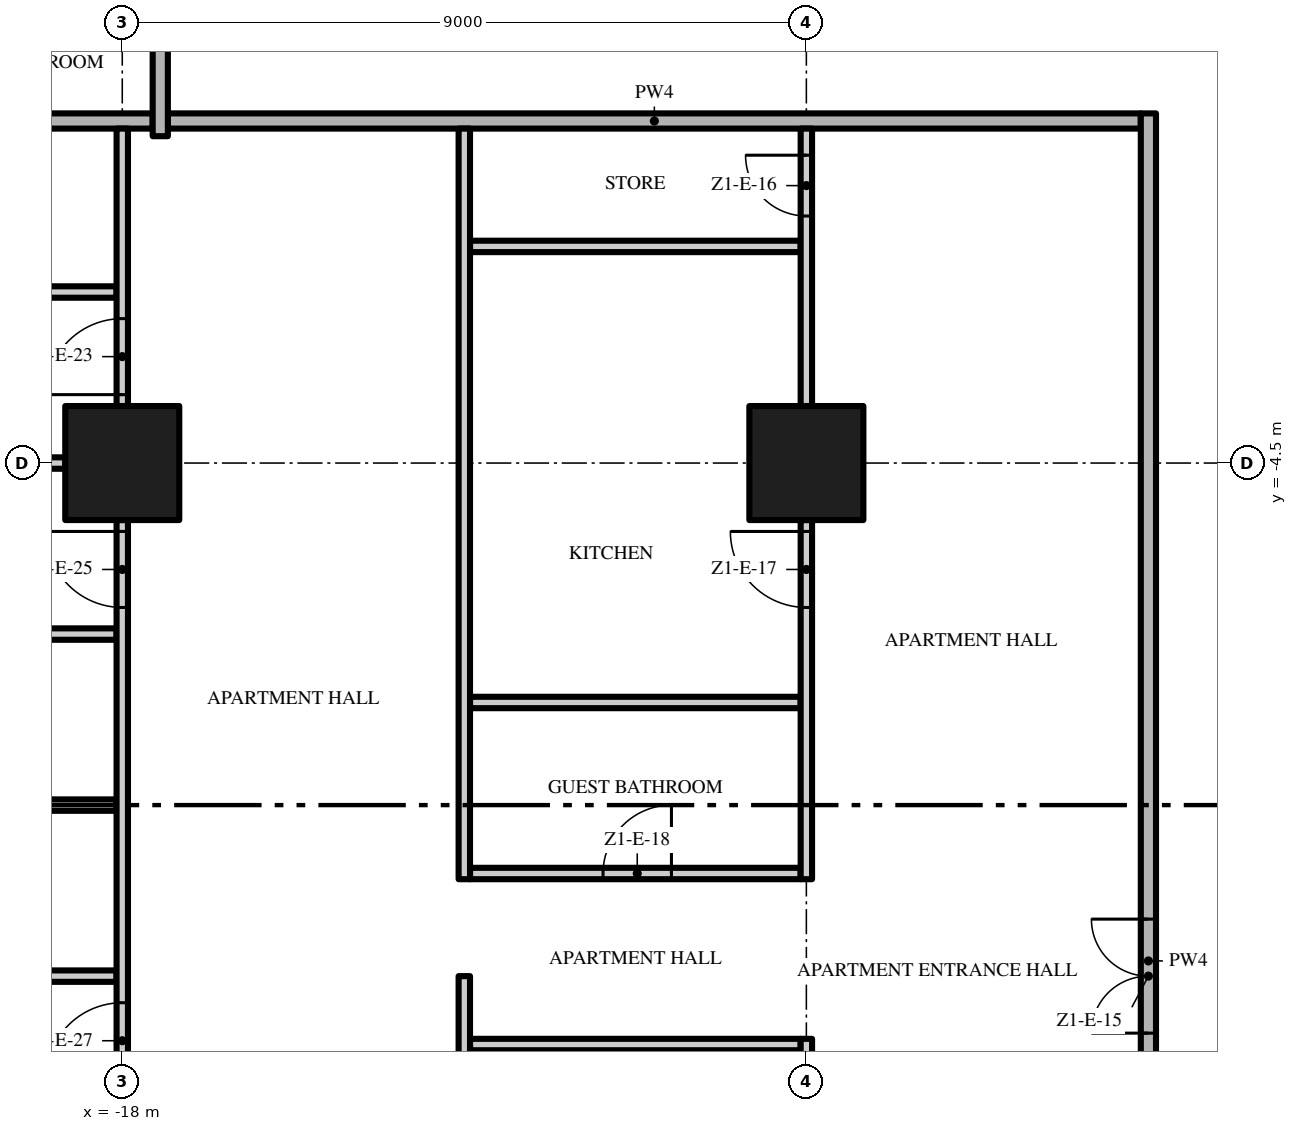
"""IFC4 building model, lengths in metres.
Left out: names, types, materials, properties, quantities, classifications, styles, units other than length and angle.
Written with IfcOpenShell. Run it as: python <this file> out.ifc"""

import sys

from ifc_helpers import new_model, si_unit, direction, frame, frame_2d, origin, origin_2d, place, context, subcontext, project, spatial, rectangle, extrude, element, fill, save


model = new_model("IFC4")
c1 = context("Model", 3, precision=1e-05, world=origin(), true_north=direction((0.0, 1.0)))
c2 = subcontext(c1, "Body", "Model", "MODEL_VIEW")
j1 = project(units=[si_unit("LENGTHUNIT", "METRE"), si_unit("PLANEANGLEUNIT", "RADIAN")], contexts=[c1])
p1 = place(None, origin())
s1 = spatial("IfcSite", under=j1, at=p1, CompositionType="ELEMENT")
p2 = place(p1, origin())
s2 = spatial("IfcBuilding", under=s1, at=p2, CompositionType="ELEMENT")
p3 = place(p2, frame((0.0, 0.0, 56.8)))
s3 = spatial("IfcBuildingStorey", under=s2, at=p3, CompositionType="ELEMENT", Elevation=56.8)
for number, where, z_axis, x_axis in (
    (1, (-18.0, -4.5, 0.0), (0.0, 0.0, 1.0), (1.0, 0.0, 0.0)),
    (2, (-9.0, -4.5, 0.0), (0.0, 0.0, 1.0), (1.0, 0.0, 0.0)),
):
    element("IfcColumn", number, at=place(p3, frame(where, z_axis=z_axis, x_axis=x_axis)), inside=s3, PredefinedType="COLUMN", context=c2, shape_type="SweptSolid", body=[
        extrude(rectangle(XDim=1.5, YDim=1.5, at=origin_2d()), origin(), (0.0, 0.0, 1.0), 3.5),
    ])
p4 = place(p3, frame((-13.425, -12.15, 0.0), z_axis=(0.0, 0.0, 1.0), x_axis=(1.0, 0.0, 0.0)))
e3 = element("IfcWall", 3, at=p4, inside=s3, PredefinedType="PARTITIONING", context=c2, shape_type="SweptSolid", body=[
    extrude(rectangle(XDim=4.35, YDim=0.15, at=frame_2d((2.175, 0.0))), origin(), (0.0, 0.0, 1.0), 3.5),
])
p5 = place(p3, frame((-20.925, -11.25, 0.0), z_axis=(0.0, 0.0, 1.0), x_axis=(1.0, 0.0, 0.0)))
e4 = element("IfcWall", 4, at=p5, inside=s3, PredefinedType="PARTITIONING", context=c2, shape_type="SweptSolid", body=[
    extrude(rectangle(XDim=2.85, YDim=0.15, at=frame_2d((1.425, 0.0))), origin(), (0.0, 0.0, 1.0), 3.5),
])
p6 = place(p3, frame((-13.425, -9.9, 0.0), z_axis=(0.0, 0.0, 1.0), x_axis=(1.0, 0.0, 0.0)))
e5 = element("IfcWall", 5, at=p6, inside=s3, PredefinedType="PARTITIONING", context=c2, shape_type="SweptSolid", body=[
    extrude(rectangle(XDim=4.35, YDim=0.15, at=frame_2d((2.175, 0.0))), origin(), (0.0, 0.0, 1.0), 3.5),
])
p7 = place(p6, frame((1.75, 0.0, 0.0)))
e6 = element("IfcOpeningElement", 6, at=p7, cuts=e5, PredefinedType="OPENING", context=c2, shape_type="SweptSolid", body=[
    extrude(rectangle(XDim=0.9, YDim=2.1, at=frame_2d((0.45, 1.05))), frame((0.0, 0.085, 0.0), z_axis=(0.0, -1.0, 0.0), x_axis=(1.0, 0.0, 0.0)), (0.0, 0.0, 1.0), 0.17),
])
p8 = place(p3, frame((-20.925, -9.0, 0.0), z_axis=(0.0, 0.0, 1.0), x_axis=(1.0, 0.0, 0.0)))
e7 = element("IfcWall", 7, at=p8, inside=s3, PredefinedType="PARTITIONING", context=c2, shape_type="SweptSolid", body=[
    extrude(rectangle(XDim=2.85, YDim=0.15, at=frame_2d((1.425, 0.0))), origin(), (0.0, 0.0, 1.0), 3.5),
])
p9 = place(p3, frame((-13.425, -7.65, 0.0), z_axis=(0.0, 0.0, 1.0), x_axis=(1.0, 0.0, 0.0)))
e8 = element("IfcWall", 8, at=p9, inside=s3, PredefinedType="PARTITIONING", context=c2, shape_type="SweptSolid", body=[
    extrude(rectangle(XDim=4.35, YDim=0.15, at=frame_2d((2.175, 0.0))), origin(), (0.0, 0.0, 1.0), 3.5),
])
p10 = place(p3, frame((-20.925, -6.75, 0.0), z_axis=(0.0, 0.0, 1.0), x_axis=(1.0, 0.0, 0.0)))
e9 = element("IfcWall", 9, at=p10, inside=s3, PredefinedType="PARTITIONING", context=c2, shape_type="SweptSolid", body=[
    extrude(rectangle(XDim=2.85, YDim=0.15, at=frame_2d((1.425, 0.0))), origin(), (0.0, 0.0, 1.0), 3.5),
])
p11 = place(p3, frame((-25.6, -4.5, 0.0), z_axis=(0.0, 0.0, 1.0), x_axis=(1.0, 0.0, 0.0)))
e10 = element("IfcWall", 10, at=p11, inside=s3, PredefinedType="PARTITIONING", context=c2, shape_type="SweptSolid", body=[
    extrude(rectangle(XDim=6.85, YDim=0.15, at=frame_2d((3.425, 0.0))), origin(), (0.0, 0.0, 1.0), 3.5),
])
p12 = place(p3, frame((-20.925, -2.25, 0.0), z_axis=(0.0, 0.0, 1.0), x_axis=(1.0, 0.0, 0.0)))
e11 = element("IfcWall", 11, at=p12, inside=s3, PredefinedType="PARTITIONING", context=c2, shape_type="SweptSolid", body=[
    extrude(rectangle(XDim=2.85, YDim=0.15, at=frame_2d((1.425, 0.0))), origin(), (0.0, 0.0, 1.0), 3.5),
])
p13 = place(p3, frame((-13.425, -1.65, 0.0), z_axis=(0.0, 0.0, 1.0), x_axis=(1.0, 0.0, 0.0)))
e12 = element("IfcWall", 12, at=p13, inside=s3, PredefinedType="PARTITIONING", context=c2, shape_type="SweptSolid", body=[
    extrude(rectangle(XDim=4.35, YDim=0.15, at=frame_2d((2.175, 0.0))), origin(), (0.0, 0.0, 1.0), 3.5),
])
p14 = place(p3, frame((-17.4, 0.0, 0.0), z_axis=(0.0, 0.0, 1.0), x_axis=(1.0, 0.0, 0.0)))
e13 = element("IfcWall", 13, at=p14, inside=s3, PredefinedType="PARTITIONING", context=c2, shape_type="SweptSolid", body=[
    extrude(rectangle(XDim=12.8, YDim=0.2, at=frame_2d((6.4, 0.0))), origin(), (0.0, 0.0, 1.0), 3.5),
])
p15 = place(p3, frame((-26.7, 0.0, 0.0), z_axis=(0.0, 0.0, 1.0), x_axis=(1.0, 0.0, 0.0)))
e14 = element("IfcWall", 14, at=p15, inside=s3, PredefinedType="PARTITIONING", context=c2, shape_type="SweptSolid", body=[
    extrude(rectangle(XDim=9.1, YDim=0.2, at=frame_2d((4.55, 0.0))), origin(), (0.0, 0.0, 1.0), 3.5),
])
p16 = place(p3, frame((-18.0, -12.75, 0.0), z_axis=(0.0, 0.0, 1.0), x_axis=(0.0, 1.0, 0.0)))
e15 = element("IfcWall", 15, at=p16, inside=s3, PredefinedType="PARTITIONING", context=c2, shape_type="SweptSolid", body=[
    extrude(rectangle(XDim=7.5, YDim=0.15, at=frame_2d((3.75, 0.0))), origin(), (0.0, 0.0, 1.0), 3.5),
])
p17 = place(p16, frame((6.35, 0.0, 0.0)))
e16 = element("IfcOpeningElement", 16, at=p17, cuts=e15, PredefinedType="OPENING", context=c2, shape_type="SweptSolid", body=[
    extrude(rectangle(XDim=1.0, YDim=2.4, at=frame_2d((0.5, 1.2))), frame((0.0, 0.085, 0.0), z_axis=(0.0, -1.0, 0.0), x_axis=(1.0, 0.0, 0.0)), (0.0, 0.0, 1.0), 0.17),
])
p18 = place(p16, frame((0.15, 0.0, 0.0)))
e17 = element("IfcOpeningElement", 17, at=p18, cuts=e15, PredefinedType="OPENING", context=c2, shape_type="SweptSolid", body=[
    extrude(rectangle(XDim=1.0, YDim=2.4, at=frame_2d((0.5, 1.2))), frame((0.0, 0.085, 0.0), z_axis=(0.0, -1.0, 0.0), x_axis=(1.0, 0.0, 0.0)), (0.0, 0.0, 1.0), 0.17),
])
p19 = place(p3, frame((-18.0, -3.75, 0.0), z_axis=(0.0, 0.0, 1.0), x_axis=(0.0, 1.0, 0.0)))
e18 = element("IfcWall", 18, at=p19, inside=s3, PredefinedType="PARTITIONING", context=c2, shape_type="SweptSolid", body=[
    extrude(rectangle(XDim=3.65, YDim=0.15, at=frame_2d((1.825, 0.0))), origin(), (0.0, 0.0, 1.0), 3.5),
])
p20 = place(p19, frame((0.15, 0.0, 0.0)))
e19 = element("IfcOpeningElement", 19, at=p20, cuts=e18, PredefinedType="OPENING", context=c2, shape_type="SweptSolid", body=[
    extrude(rectangle(XDim=1.0, YDim=2.4, at=frame_2d((0.5, 1.2))), frame((0.0, 0.085, 0.0), z_axis=(0.0, -1.0, 0.0), x_axis=(1.0, 0.0, 0.0)), (0.0, 0.0, 1.0), 0.17),
])
p21 = place(p3, frame((-17.5, -0.2, 0.0), z_axis=(0.0, 0.0, 1.0), x_axis=(0.0, 1.0, 0.0)))
e20 = element("IfcWall", 20, at=p21, inside=s3, PredefinedType="PARTITIONING", context=c2, shape_type="SweptSolid", body=[
    extrude(rectangle(XDim=3.95, YDim=0.2, at=frame_2d((1.975, 0.0))), origin(), (0.0, 0.0, 1.0), 3.5),
])
p22 = place(p3, frame((-13.5, -11.25, 0.0), z_axis=(0.0, 0.0, 1.0), x_axis=(0.0, -1.0, 0.0)))
e21 = element("IfcWall", 21, at=p22, inside=s3, PredefinedType="PARTITIONING", context=c2, shape_type="SweptSolid", body=[
    extrude(rectangle(XDim=10.95, YDim=0.15, at=frame_2d((5.475, 0.0))), origin(), (0.0, 0.0, 1.0), 3.5),
])
p23 = place(p22, frame((1.8, 0.0, 0.0)))
e22 = element("IfcOpeningElement", 22, at=p23, cuts=e21, PredefinedType="OPENING", context=c2, shape_type="SweptSolid", body=[
    extrude(rectangle(XDim=0.8, YDim=2.0, at=frame_2d((0.4, 1.0))), frame((0.0, 0.085, 0.0), z_axis=(0.0, -1.0, 0.0), x_axis=(1.0, 0.0, 0.0)), (0.0, 0.0, 1.0), 0.17),
])
p24 = place(p22, frame((9.95, 0.0, 0.0)))
e23 = element("IfcOpeningElement", 23, at=p24, cuts=e21, PredefinedType="OPENING", context=c2, shape_type="SweptSolid", body=[
    extrude(rectangle(XDim=0.8, YDim=2.0, at=frame_2d((0.4, 1.0))), frame((0.0, 0.085, 0.0), z_axis=(0.0, -1.0, 0.0), x_axis=(1.0, 0.0, 0.0)), (0.0, 0.0, 1.0), 0.17),
])
p25 = place(p3, frame((-13.5, -9.975, 0.0), z_axis=(0.0, 0.0, 1.0), x_axis=(0.0, 1.0, 0.0)))
e24 = element("IfcWall", 24, at=p25, inside=s3, PredefinedType="PARTITIONING", context=c2, shape_type="SweptSolid", body=[
    extrude(rectangle(XDim=9.875, YDim=0.15, at=frame_2d((4.938, 0.0))), origin(), (0.0, 0.0, 1.0), 3.5),
])
p26 = place(p3, frame((-9.0, -12.75, 0.0), z_axis=(0.0, 0.0, 1.0), x_axis=(0.0, 1.0, 0.0)))
e25 = element("IfcWall", 25, at=p26, inside=s3, PredefinedType="PARTITIONING", context=c2, shape_type="SweptSolid", body=[
    extrude(rectangle(XDim=0.675, YDim=0.15, at=frame_2d((0.338, 0.0))), origin(), (0.0, 0.0, 1.0), 3.5),
])
p27 = place(p3, frame((-9.0, -9.975, 0.0), z_axis=(0.0, 0.0, 1.0), x_axis=(0.0, 1.0, 0.0)))
e26 = element("IfcWall", 26, at=p27, inside=s3, PredefinedType="PARTITIONING", context=c2, shape_type="SweptSolid", body=[
    extrude(rectangle(XDim=4.725, YDim=0.15, at=frame_2d((2.362, 0.0))), origin(), (0.0, 0.0, 1.0), 3.5),
])
p28 = place(p27, frame((3.575, 0.0, 0.0)))
e27 = element("IfcOpeningElement", 27, at=p28, cuts=e26, PredefinedType="OPENING", context=c2, shape_type="SweptSolid", body=[
    extrude(rectangle(XDim=1.0, YDim=2.4, at=frame_2d((0.5, 1.2))), frame((0.0, 0.085, 0.0), z_axis=(0.0, -1.0, 0.0), x_axis=(1.0, 0.0, 0.0)), (0.0, 0.0, 1.0), 0.17),
])
p29 = place(p3, frame((-9.0, -3.75, 0.0), z_axis=(0.0, 0.0, 1.0), x_axis=(0.0, 1.0, 0.0)))
e28 = element("IfcWall", 28, at=p29, inside=s3, PredefinedType="PARTITIONING", context=c2, shape_type="SweptSolid", body=[
    extrude(rectangle(XDim=3.65, YDim=0.15, at=frame_2d((1.825, 0.0))), origin(), (0.0, 0.0, 1.0), 3.5),
])
p30 = place(p29, frame((2.5, 0.0, 0.0)))
e29 = element("IfcOpeningElement", 29, at=p30, cuts=e28, PredefinedType="OPENING", context=c2, shape_type="SweptSolid", body=[
    extrude(rectangle(XDim=0.8, YDim=2.0, at=frame_2d((0.4, 1.0))), frame((0.0, 0.085, 0.0), z_axis=(0.0, -1.0, 0.0), x_axis=(1.0, 0.0, 0.0)), (0.0, 0.0, 1.0), 0.17),
])
p31 = place(p3, frame((-4.5, -22.2, 0.0), z_axis=(0.0, 0.0, 1.0), x_axis=(0.0, 1.0, 0.0)))
e30 = element("IfcWall", 30, at=p31, inside=s3, PredefinedType="PARTITIONING", context=c2, shape_type="SweptSolid", body=[
    extrude(rectangle(XDim=22.3, YDim=0.2, at=frame_2d((11.15, 0.0))), origin(), (0.0, 0.0, 1.0), 3.5),
])
p32 = place(p31, frame((10.2, 0.0, 0.0)))
e31 = element("IfcOpeningElement", 31, at=p32, cuts=e30, PredefinedType="OPENING", context=c2, shape_type="SweptSolid", body=[
    extrude(rectangle(XDim=1.5, YDim=2.4, at=frame_2d((0.75, 1.2))), frame((0.0, 0.11, 0.0), z_axis=(0.0, -1.0, 0.0), x_axis=(1.0, 0.0, 0.0)), (0.0, 0.0, 1.0), 0.22),
])
p33 = place(p32, origin())
e32 = element("IfcDoor", 32, at=p33, inside=s3, OperationType="DOUBLE_DOOR_SINGLE_SWING", PredefinedType="DOOR", context=c2, shape_type="SweptSolid", body=[
    extrude(rectangle(XDim=1.5, YDim=2.4, at=frame_2d((0.75, 1.2))), frame((0.0, 0.025, 0.0), z_axis=(0.0, -1.0, 0.0), x_axis=(1.0, 0.0, 0.0)), (0.0, 0.0, 1.0), 0.05),
])
fill(e31, e32)
p34 = place(p30, origin())
e33 = element("IfcDoor", 33, at=p34, inside=s3, OperationType="SINGLE_SWING_RIGHT", PredefinedType="DOOR", context=c2, shape_type="SweptSolid", body=[
    extrude(rectangle(XDim=0.8, YDim=2.0, at=frame_2d((0.4, 1.0))), frame((0.0, 0.025, 0.0), z_axis=(0.0, -1.0, 0.0), x_axis=(1.0, 0.0, 0.0)), (0.0, 0.0, 1.0), 0.05),
])
fill(e29, e33)
p35 = place(p28, origin())
e34 = element("IfcDoor", 34, at=p35, inside=s3, OperationType="SINGLE_SWING_RIGHT", PredefinedType="DOOR", context=c2, shape_type="SweptSolid", body=[
    extrude(rectangle(XDim=1.0, YDim=2.4, at=frame_2d((0.5, 1.2))), frame((0.0, 0.025, 0.0), z_axis=(0.0, -1.0, 0.0), x_axis=(1.0, 0.0, 0.0)), (0.0, 0.0, 1.0), 0.05),
])
fill(e27, e34)
p36 = place(p7, origin())
e35 = element("IfcDoor", 35, at=p36, inside=s3, OperationType="SINGLE_SWING_RIGHT", PredefinedType="DOOR", context=c2, shape_type="SweptSolid", body=[
    extrude(rectangle(XDim=0.9, YDim=2.1, at=frame_2d((0.45, 1.05))), frame((0.0, 0.025, 0.0), z_axis=(0.0, -1.0, 0.0), x_axis=(1.0, 0.0, 0.0)), (0.0, 0.0, 1.0), 0.05),
])
fill(e6, e35)
p37 = place(p20, origin())
e36 = element("IfcDoor", 36, at=p37, inside=s3, OperationType="SINGLE_SWING_LEFT", PredefinedType="DOOR", context=c2, shape_type="SweptSolid", body=[
    extrude(rectangle(XDim=1.0, YDim=2.4, at=frame_2d((0.5, 1.2))), frame((0.0, 0.025, 0.0), z_axis=(0.0, -1.0, 0.0), x_axis=(1.0, 0.0, 0.0)), (0.0, 0.0, 1.0), 0.05),
])
fill(e19, e36)
p38 = place(p17, origin())
e37 = element("IfcDoor", 37, at=p38, inside=s3, OperationType="SINGLE_SWING_RIGHT", PredefinedType="DOOR", context=c2, shape_type="SweptSolid", body=[
    extrude(rectangle(XDim=1.0, YDim=2.4, at=frame_2d((0.5, 1.2))), frame((0.0, 0.025, 0.0), z_axis=(0.0, -1.0, 0.0), x_axis=(1.0, 0.0, 0.0)), (0.0, 0.0, 1.0), 0.05),
])
fill(e16, e37)
p39 = place(p18, origin())
e38 = element("IfcDoor", 38, at=p39, inside=s3, OperationType="SINGLE_SWING_LEFT", PredefinedType="DOOR", context=c2, shape_type="SweptSolid", body=[
    extrude(rectangle(XDim=1.0, YDim=2.4, at=frame_2d((0.5, 1.2))), frame((0.0, 0.025, 0.0), z_axis=(0.0, -1.0, 0.0), x_axis=(1.0, 0.0, 0.0)), (0.0, 0.0, 1.0), 0.05),
])
fill(e17, e38)
save(model, sys.argv[1])
